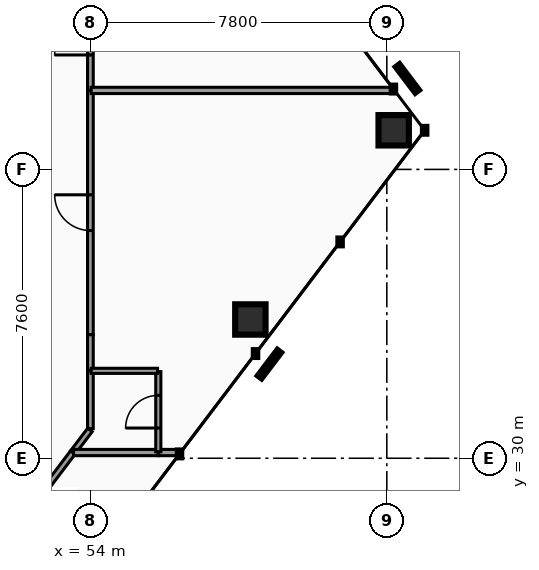
"""IFC4 building model, lengths in metres.
Left out: names, types, materials, properties, quantities, classifications, styles, units other than length and angle.
Written with IfcOpenShell. Run it as: python <this file> out.ifc"""

import sys

from ifc_helpers import new_model, si_unit, direction, frame, frame_2d, origin, origin_2d, place, context, subcontext, project, spatial, rectangle, hollow_rectangle, extrude, element, fill, save


model = new_model("IFC4")
c1 = context("Model", 3, precision=1e-05, world=origin(), true_north=direction((0.0, 1.0)))
c2 = subcontext(c1, "Body", "Model", "MODEL_VIEW")
j1 = project(units=[si_unit("LENGTHUNIT", "METRE"), si_unit("PLANEANGLEUNIT", "RADIAN")], contexts=[c1])
p1 = place(None, origin())
s1 = spatial("IfcSite", under=j1, at=p1, CompositionType="ELEMENT")
p2 = place(p1, origin())
s2 = spatial("IfcBuilding", under=s1, at=p2, CompositionType="ELEMENT")
p3 = place(p2, frame((0.0, 0.0, 130.9)))
s3 = spatial("IfcBuildingStorey", under=s2, at=p3, CompositionType="ELEMENT", Elevation=130.9)
p4 = place(p3, frame((54.438, 28.673, 0.0), z_axis=(-0.036360710558, 0.038520063101, 0.998596066218), x_axis=(-0.727195467978, -0.686430441744, 0.0)))
e1 = element("IfcColumn", 1, at=p4, inside=s3, PredefinedType="COLUMN", context=c2, shape_type="SweptSolid", body=[
    extrude(hollow_rectangle(XDim=0.8, YDim=0.8, WallThickness=0.04, at=origin_2d()), origin(), (0.0, 0.0, 1.0), 3.505),
])
p5 = place(p3, frame((58.209, 33.651, 0.0), z_axis=(-0.008764028326, 0.074911575455, 0.997151667336), x_axis=(-0.993225936587, -0.116199134642, 0.0)))
e2 = element("IfcColumn", 2, at=p5, inside=s3, PredefinedType="COLUMN", context=c2, shape_type="SweptSolid", body=[
    extrude(hollow_rectangle(XDim=0.8, YDim=0.8, WallThickness=0.04, at=origin_2d()), origin(), (0.0, 0.0, 1.0), 3.51),
])
p6 = place(p3, frame((61.981, 38.629, 0.0), z_axis=(0.01871421422, 0.11089904723, 0.993655463181), x_axis=(-0.986058770777, 0.166397417569, 0.0)))
e3 = element("IfcColumn", 3, at=p6, inside=s3, PredefinedType="COLUMN", context=c2, shape_type="SweptSolid", body=[
    extrude(hollow_rectangle(XDim=0.8, YDim=0.8, WallThickness=0.04, at=origin_2d()), origin(), (0.0, 0.0, 1.0), 3.522),
])
p7 = place(p3, frame((51.662, 27.675, 0.0), z_axis=(0.0, 0.0, 1.0), x_axis=(0.603831940294, 0.797111653334, 0.0)))
e4 = element("IfcWall", 4, at=p7, inside=s3, PredefinedType="PARTITIONING", context=c2, shape_type="SweptSolid", body=[
    extrude(rectangle(XDim=3.104, YDim=0.15, at=frame_2d((1.552, 0.0))), origin(), (0.0, 0.0, 1.0), 2.457),
])
p8 = place(p3, frame((54.0, 33.25, 0.0), z_axis=(0.0, 0.0, 1.0), x_axis=(0.0, 1.0, 0.0)))
e5 = element("IfcWall", 5, at=p8, inside=s3, PredefinedType="PARTITIONING", context=c2, shape_type="SweptSolid", body=[
    extrude(rectangle(XDim=6.423, YDim=0.15, at=frame_2d((3.212, 0.0))), origin(), (0.0, 0.0, 1.0), 2.457),
])
p9 = place(p8, frame((2.742, 0.0, 0.0)))
e6 = element("IfcOpeningElement", 6, at=p9, cuts=e5, PredefinedType="OPENING", context=c2, shape_type="SweptSolid", body=[
    extrude(rectangle(XDim=0.94, YDim=2.05, at=frame_2d((0.47, 1.025))), frame((0.0, 0.085, 0.0), z_axis=(0.0, -1.0, 0.0), x_axis=(1.0, 0.0, 0.0)), (0.0, 0.0, 1.0), 0.17),
])
p10 = place(p3, frame((54.0, 32.305, 0.0), z_axis=(0.0, 0.0, 1.0), x_axis=(0.0, 1.0, 0.0)))
e7 = element("IfcWall", 7, at=p10, inside=s3, PredefinedType="PARTITIONING", context=c2, shape_type="SweptSolid", body=[
    extrude(rectangle(XDim=0.945, YDim=0.15, at=frame_2d((0.473, 0.0))), origin(), (0.0, 0.0, 1.0), 2.457),
])
p11 = place(p3, frame((54.0, 30.781, 0.0), z_axis=(0.0, 0.0, 1.0), x_axis=(0.0, 1.0, 0.0)))
e8 = element("IfcWall", 8, at=p11, inside=s3, PredefinedType="PARTITIONING", context=c2, shape_type="SweptSolid", body=[
    extrude(rectangle(XDim=1.514, YDim=0.15, at=frame_2d((0.757, 0.0))), origin(), (0.0, 0.0, 1.0), 2.457),
])
p12 = place(p3, frame((53.54, 30.154, 0.0), z_axis=(0.0, 0.0, 1.0), x_axis=(0.603680225987, 0.797226557982, 0.0)))
e9 = element("IfcWall", 9, at=p12, inside=s3, PredefinedType="PARTITIONING", context=c2, shape_type="SweptSolid", body=[
    extrude(rectangle(XDim=0.742, YDim=0.15, at=frame_2d((0.371, 0.0))), origin(), (0.0, 0.0, 1.0), 2.457),
])
p13 = place(p3, frame((54.0, 39.683, 0.0), z_axis=(0.0, 0.0, 1.0), x_axis=(0.0, 1.0, 0.0)))
e10 = element("IfcWall", 10, at=p13, inside=s3, PredefinedType="PARTITIONING", context=c2, shape_type="SweptSolid", body=[
    extrude(rectangle(XDim=2.797, YDim=0.15, at=frame_2d((1.398, 0.0))), origin(), (0.0, 0.0, 1.0), 2.457),
])
p14 = place(p13, frame((0.928, 0.0, 0.0)))
e11 = element("IfcOpeningElement", 11, at=p14, cuts=e10, PredefinedType="OPENING", context=c2, shape_type="SweptSolid", body=[
    extrude(rectangle(XDim=0.94, YDim=2.05, at=frame_2d((0.47, 1.025))), frame((0.0, 0.085, 0.0), z_axis=(0.0, -1.0, 0.0), x_axis=(1.0, 0.0, 0.0)), (0.0, 0.0, 1.0), 0.17),
])
p15 = place(p3, frame((55.792, 30.15, 0.0), z_axis=(0.0, 0.0, 1.0), x_axis=(1.0, 0.0, 0.0)))
e12 = element("IfcWall", 12, at=p15, inside=s3, PredefinedType="PARTITIONING", context=c2, shape_type="SweptSolid", body=[
    extrude(rectangle(XDim=0.565, YDim=0.165, at=frame_2d((0.283, 0.0))), origin(), (0.0, 0.0, 1.0), 2.457),
])
p16 = place(p3, frame((53.557, 30.15, 0.0), z_axis=(0.0, 0.0, 1.0), x_axis=(1.0, 0.0, 0.0)))
e13 = element("IfcWall", 13, at=p16, inside=s3, PredefinedType="PARTITIONING", context=c2, shape_type="SweptSolid", body=[
    extrude(rectangle(XDim=2.225, YDim=0.165, at=frame_2d((1.113, 0.0))), origin(), (0.0, 0.0, 1.0), 2.457),
])
p17 = place(p3, frame((55.787, 30.17, 0.0), z_axis=(0.0, 0.0, 1.0), x_axis=(0.0, 1.0, 0.0)))
e14 = element("IfcWall", 14, at=p17, inside=s3, PredefinedType="PARTITIONING", context=c2, shape_type="SweptSolid", body=[
    extrude(rectangle(XDim=2.11, YDim=0.135, at=frame_2d((1.055, 0.0))), origin(), (0.0, 0.0, 1.0), 2.457),
])
p18 = place(p17, frame((0.625, 0.0, 0.0)))
e15 = element("IfcOpeningElement", 15, at=p18, cuts=e14, PredefinedType="OPENING", context=c2, shape_type="SweptSolid", body=[
    extrude(rectangle(XDim=0.86, YDim=2.05, at=frame_2d((0.43, 1.025))), frame((0.0, 0.077, 0.0), z_axis=(0.0, -1.0, 0.0), x_axis=(1.0, 0.0, 0.0)), (0.0, 0.0, 1.0), 0.155),
])
p19 = place(p3, frame((54.02, 32.3, 0.0), z_axis=(0.0, 0.0, 1.0), x_axis=(1.0, 0.0, 0.0)))
e16 = element("IfcWall", 16, at=p19, inside=s3, PredefinedType="PARTITIONING", context=c2, shape_type="SweptSolid", body=[
    extrude(rectangle(XDim=1.747, YDim=0.135, at=frame_2d((0.874, 0.0))), origin(), (0.0, 0.0, 1.0), 2.457),
])
p20 = place(p3, frame((54.02, 39.678, 0.0), z_axis=(0.0, 0.0, 1.0), x_axis=(1.0, 0.0, 0.0)))
e17 = element("IfcWall", 17, at=p20, inside=s3, PredefinedType="PARTITIONING", context=c2, shape_type="SweptSolid", body=[
    extrude(rectangle(XDim=7.967, YDim=0.165, at=frame_2d((3.983, 0.0))), origin(), (0.0, 0.0, 1.0), 2.457),
])
p21 = place(p9, origin())
e18 = element("IfcDoor", 18, at=p21, inside=s3, OperationType="SINGLE_SWING_RIGHT", PredefinedType="DOOR", context=c2, shape_type="SweptSolid", body=[
    extrude(rectangle(XDim=0.94, YDim=2.05, at=frame_2d((0.47, 1.025))), frame((0.0, 0.025, 0.0), z_axis=(0.0, -1.0, 0.0), x_axis=(1.0, 0.0, 0.0)), (0.0, 0.0, 1.0), 0.05),
])
fill(e6, e18)
p22 = place(p14, origin())
e19 = element("IfcDoor", 19, at=p22, inside=s3, OperationType="SINGLE_SWING_LEFT", PredefinedType="DOOR", context=c2, shape_type="SweptSolid", body=[
    extrude(rectangle(XDim=0.94, YDim=2.05, at=frame_2d((0.47, 1.025))), frame((0.0, 0.025, 0.0), z_axis=(0.0, -1.0, 0.0), x_axis=(1.0, 0.0, 0.0)), (0.0, 0.0, 1.0), 0.05),
])
fill(e11, e19)
p23 = place(p18, origin())
e20 = element("IfcDoor", 20, at=p23, inside=s3, OperationType="SINGLE_SWING_LEFT", PredefinedType="DOOR", context=c2, shape_type="SweptSolid", body=[
    extrude(rectangle(XDim=0.86, YDim=2.05, at=frame_2d((0.43, 1.025))), frame((0.0, 0.025, 0.0), z_axis=(0.0, -1.0, 0.0), x_axis=(1.0, 0.0, 0.0)), (0.0, 0.0, 1.0), 0.05),
])
fill(e15, e20)
save(model, sys.argv[1])
